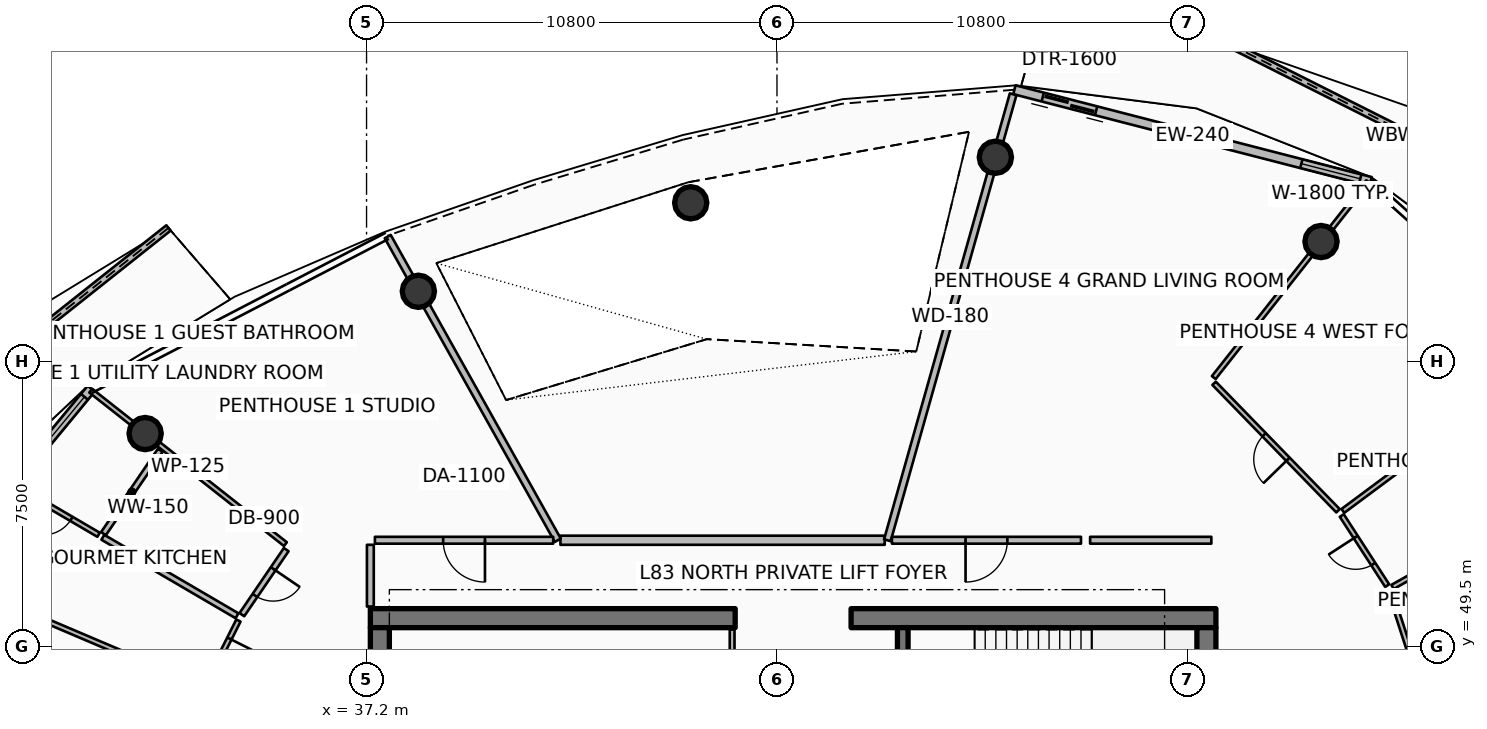
"""IFC4 building model, lengths in metres.
Left out: names, types, materials, properties, quantities, classifications, styles, units other than length and angle.
Written with IfcOpenShell. Run it as: python <this file> out.ifc"""

import sys

from ifc_helpers import new_model, si_unit, direction, frame, frame_2d, origin, origin_2d, place, context, subcontext, project, spatial, polyline, rectangle, circle, outline, extrude, element, fill, save


model = new_model("IFC4")
c1 = context("Model", 3, precision=1e-05, world=origin(), true_north=direction((0.0, 1.0)))
c2 = subcontext(c1, "Body", "Model", "MODEL_VIEW")
j1 = project(units=[si_unit("LENGTHUNIT", "METRE"), si_unit("PLANEANGLEUNIT", "RADIAN")], contexts=[c1])
p1 = place(None, origin())
s1 = spatial("IfcSite", under=j1, at=p1, CompositionType="ELEMENT")
p2 = place(p1, origin())
s2 = spatial("IfcBuilding", under=s1, at=p2, CompositionType="ELEMENT")
p3 = place(p2, frame((0.0, 0.0, 330.5)))
s3 = spatial("IfcBuildingStorey", under=s2, at=p3, CompositionType="ELEMENT", Elevation=330.5)
p4 = place(p3, frame((37.3, 50.25, 0.0), z_axis=(0.0, 0.0, 1.0), x_axis=(1.0, 0.0, 0.0)))
e1 = element("IfcWall", 1, at=p4, inside=s3, PredefinedType="SHEAR", context=c2, shape_type="SweptSolid", body=[
    extrude(rectangle(XDim=9.6, YDim=0.5, at=frame_2d((4.8, 0.0))), origin(), (0.0, 0.0, 1.0), 4.2),
])
p5 = place(p3, frame((49.95, 50.25, 0.0), z_axis=(0.0, 0.0, 1.0), x_axis=(1.0, 0.0, 0.0)))
e2 = element("IfcWall", 2, at=p5, inside=s3, PredefinedType="SHEAR", context=c2, shape_type="SweptSolid", body=[
    extrude(rectangle(XDim=9.6, YDim=0.5, at=frame_2d((4.8, 0.0))), origin(), (0.0, 0.0, 1.0), 4.2),
])
for number, where, z_axis, x_axis in (
    (3, (37.55, 34.0, 0.0), (0.0, 0.0, 1.0), (0.0, 1.0, 0.0)),
    (4, (59.3, 34.0, 0.0), (0.0, 0.0, 1.0), (0.0, 1.0, 0.0)),
):
    element("IfcWall", number, at=place(p3, frame(where, z_axis=z_axis, x_axis=x_axis)), inside=s3, PredefinedType="SHEAR", context=c2, shape_type="SweptSolid", body=[
        extrude(rectangle(XDim=16.0, YDim=0.5, at=frame_2d((8.0, 0.0))), origin(), (0.0, 0.0, 1.0), 4.2),
    ])
p6 = place(p3, frame((51.31, 46.5, 0.0), z_axis=(0.0, 0.0, 1.0), x_axis=(0.0, 1.0, 0.0)))
e5 = element("IfcWall", 5, at=p6, inside=s3, PredefinedType="SHEAR", context=c2, shape_type="SweptSolid", body=[
    extrude(rectangle(XDim=3.5, YDim=0.28, at=frame_2d((1.75, 0.0))), origin(), (0.0, 0.0, 1.0), 4.2),
])
for number, where, z_axis, x_axis in (
    (6, (62.316, 60.159, 0.0), (0.0, 0.0, 1.0), (1.0, 0.0, 0.0)),
    (7, (53.747, 62.376, 0.0), (0.0, 0.0, 1.0), (1.0, 0.0, 0.0)),
):
    element("IfcColumn", number, at=place(p3, frame(where, z_axis=z_axis, x_axis=x_axis)), inside=s3, PredefinedType="COLUMN", context=c2, shape_type="SweptSolid", body=[
        extrude(circle(Radius=0.425, at=origin_2d()), origin(), (0.0, 0.0, 1.0), 3.94),
    ])
p7 = place(p3, frame((45.73, 61.179, 0.0), z_axis=(0.0, 0.0, 1.0), x_axis=(1.0, 0.0, 0.0)))
e8 = element("IfcColumn", 8, at=p7, inside=s3, PredefinedType="COLUMN", context=c2, shape_type="SweptSolid", body=[
    extrude(circle(Radius=0.425, at=origin_2d()), origin(), (0.0, 0.0, 1.0), 4.196),
])
for number, where, z_axis, x_axis in (
    (9, (38.563, 58.851, 0.0), (0.0, 0.0, 1.0), (1.0, 0.0, 0.0)),
    (10, (31.374, 55.107, 0.0), (0.0, 0.0, 1.0), (1.0, 0.0, 0.0)),
):
    element("IfcColumn", number, at=place(p3, frame(where, z_axis=z_axis, x_axis=x_axis)), inside=s3, PredefinedType="COLUMN", context=c2, shape_type="SweptSolid", body=[
        extrude(circle(Radius=0.425, at=origin_2d()), origin(), (0.0, 0.0, 1.0), 3.94),
    ])
p8 = place(p3, frame((69.453, 60.551, 0.0), z_axis=(0.0, 0.0, 1.0), x_axis=(-0.893288240785, 0.449484281009, 0.0)))
e11 = element("IfcWall", 11, at=p8, inside=s3, PredefinedType="PARAPET", context=c2, shape_type="SweptSolid", body=[
    extrude(outline(polyline([(0.0, 0.0), (10.573, 0.0), (10.573, 1.348), (5.287, 1.562), (0.0, 1.747), (0.0, 0.0)])), frame((0.0, 0.09, 0.0), z_axis=(0.0, -1.0, 0.0), x_axis=(1.0, 0.0, 0.0)), (0.0, 0.0, 1.0), 0.18),
])
p9 = place(p3, frame((31.988, 60.517, 0.0), z_axis=(0.0, 0.0, 1.0), x_axis=(-0.78337055778, -0.621554960727, 0.0)))
e12 = element("IfcWall", 12, at=p9, inside=s3, PredefinedType="PARAPET", context=c2, shape_type="SweptSolid", body=[
    extrude(outline(polyline([(0.0, 0.0), (10.029, 0.0), (10.029, 1.832), (5.014, 1.853), (0.0, 1.756), (0.0, 0.0)])), frame((0.0, 0.09, 0.0), z_axis=(0.0, -1.0, 0.0), x_axis=(1.0, 0.0, 0.0)), (0.0, 0.0, 1.0), 0.18),
])
p10 = place(p3, frame((63.62, 61.74, 0.0), z_axis=(0.0, 0.0, 1.0), x_axis=(-0.968389062354, 0.249444630957, 0.0)))
e13 = element("IfcWall", 13, at=p10, inside=s3, PredefinedType="SOLIDWALL", context=c2, shape_type="SweptSolid", body=[
    extrude(rectangle(XDim=9.678, YDim=0.24, at=frame_2d((4.839, 0.0))), origin(), (0.0, 0.0, 1.0), 2.89),
])
p11 = place(p10, frame((7.458, 0.0, 0.0)))
e14 = element("IfcOpeningElement", 14, at=p11, cuts=e13, PredefinedType="OPENING", context=c2, shape_type="SweptSolid", body=[
    extrude(rectangle(XDim=1.45, YDim=2.15, at=frame_2d((0.725, 1.075))), frame((0.0, 0.13, 0.0), z_axis=(0.0, -1.0, 0.0), x_axis=(1.0, 0.0, 0.0)), (0.0, 0.0, 1.0), 0.26),
])
p12 = place(p10, frame((0.28, 0.0, 0.65)))
e15 = element("IfcOpeningElement", 15, at=p12, cuts=e13, PredefinedType="OPENING", context=c2, shape_type="SweptSolid", body=[
    extrude(rectangle(XDim=1.6, YDim=1.5, at=frame_2d((0.8, 0.75))), frame((0.0, 0.13, 0.0), z_axis=(0.0, -1.0, 0.0), x_axis=(1.0, 0.0, 0.0)), (0.0, 0.0, 1.0), 0.26),
])
p13 = place(p3, frame((29.955, 56.289, 0.0), z_axis=(0.0, 0.0, 1.0), x_axis=(-0.636803612721, -0.771026042897, 0.0)))
e16 = element("IfcWall", 16, at=p13, inside=s3, PredefinedType="SOLIDWALL", context=c2, shape_type="SweptSolid", body=[
    extrude(rectangle(XDim=9.728, YDim=0.24, at=frame_2d((4.864, 0.0))), origin(), (0.0, 0.0, 1.0), 2.89),
])
p14 = place(p13, frame((7.508, 0.0, 0.0)))
e17 = element("IfcOpeningElement", 17, at=p14, cuts=e16, PredefinedType="OPENING", context=c2, shape_type="SweptSolid", body=[
    extrude(rectangle(XDim=1.45, YDim=2.15, at=frame_2d((0.725, 1.075))), frame((0.0, 0.13, 0.0), z_axis=(0.0, -1.0, 0.0), x_axis=(1.0, 0.0, 0.0)), (0.0, 0.0, 1.0), 0.26),
])
p15 = place(p13, frame((0.28, 0.0, 0.65)))
e18 = element("IfcOpeningElement", 18, at=p15, cuts=e16, PredefinedType="OPENING", context=c2, shape_type="SweptSolid", body=[
    extrude(rectangle(XDim=1.6, YDim=1.5, at=frame_2d((0.8, 0.75))), frame((0.0, 0.13, 0.0), z_axis=(0.0, -1.0, 0.0), x_axis=(1.0, 0.0, 0.0)), (0.0, 0.0, 1.0), 0.26),
])
p16 = place(p3, frame((46.82, 47.92, 0.0), z_axis=(0.0, 0.0, 1.0), x_axis=(0.0, 1.0, 0.0)))
e19 = element("IfcWall", 19, at=p16, inside=s3, PredefinedType="PARTITIONING", context=c2, shape_type="SweptSolid", body=[
    extrude(rectangle(XDim=2.03, YDim=0.125, at=frame_2d((1.015, 0.0))), origin(), (0.0, 0.0, 1.0), 3.38),
])
p17 = place(p3, frame((50.835, 52.3, 0.0), z_axis=(0.0, 0.0, 1.0), x_axis=(-1.0, 0.0, 0.0)))
e20 = element("IfcWall", 20, at=p17, inside=s3, PredefinedType="SOLIDWALL", context=c2, shape_type="SweptSolid", body=[
    extrude(rectangle(XDim=8.533, YDim=0.24, at=frame_2d((4.267, 0.0))), origin(), (0.0, 0.0, 1.0), 3.38),
])
p18 = place(p3, frame((50.905, 52.3, 0.0), z_axis=(0.0, 0.0, 1.0), x_axis=(0.271453030279, 0.962451688321, 0.0)))
e21 = element("IfcWall", 21, at=p18, inside=s3, PredefinedType="PARTITIONING", context=c2, shape_type="SweptSolid", body=[
    extrude(rectangle(XDim=12.191, YDim=0.18, at=frame_2d((6.096, 0.0))), origin(), (0.0, 0.0, 1.0), 3.38),
])
p19 = place(p3, frame((42.232, 52.3, 0.0), z_axis=(0.0, 0.0, 1.0), x_axis=(-0.488623665245, 0.872494649704, 0.0)))
e22 = element("IfcWall", 22, at=p19, inside=s3, PredefinedType="PARTITIONING", context=c2, shape_type="SweptSolid", body=[
    extrude(rectangle(XDim=9.157, YDim=0.18, at=frame_2d((4.579, 0.0))), origin(), (0.0, 0.0, 1.0), 3.38),
])
p20 = place(p3, frame((42.112, 52.3, 0.0), z_axis=(0.0, 0.0, 1.0), x_axis=(-1.0, 0.0, 0.0)))
e23 = element("IfcWall", 23, at=p20, inside=s3, PredefinedType="PARTITIONING", context=c2, shape_type="SweptSolid", body=[
    extrude(rectangle(XDim=4.692, YDim=0.18, at=frame_2d((2.346, 0.0))), origin(), (0.0, 0.0, 1.0), 3.38),
])
p21 = place(p20, frame((1.796, 0.0, 0.0)))
e24 = element("IfcOpeningElement", 24, at=p21, cuts=e23, PredefinedType="OPENING", context=c2, shape_type="SweptSolid", body=[
    extrude(rectangle(XDim=1.1, YDim=2.1, at=frame_2d((0.55, 1.05))), frame((0.0, 0.1, 0.0), z_axis=(0.0, -1.0, 0.0), x_axis=(1.0, 0.0, 0.0)), (0.0, 0.0, 1.0), 0.2),
])
p22 = place(p3, frame((37.3, 52.18, 0.0), z_axis=(0.0, 0.0, 1.0), x_axis=(0.0, -1.0, 0.0)))
e25 = element("IfcWall", 25, at=p22, inside=s3, PredefinedType="PARTITIONING", context=c2, shape_type="SweptSolid", body=[
    extrude(rectangle(XDim=1.625, YDim=0.18, at=frame_2d((0.812, 0.0))), origin(), (0.0, 0.0, 1.0), 3.38),
])
p23 = place(p3, frame((35.064, 52.198, 0.0), z_axis=(0.0, 0.0, 1.0), x_axis=(-0.785319571145, 0.619090600136, 0.0)))
e26 = element("IfcWall", 26, at=p23, inside=s3, PredefinedType="PARTITIONING", context=c2, shape_type="SweptSolid", body=[
    extrude(rectangle(XDim=6.521, YDim=0.125, at=frame_2d((3.26, 0.0))), origin(), (0.0, 0.0, 1.0), 3.38),
])
p24 = place(p3, frame((35.086, 52.053, 0.0), z_axis=(0.0, 0.0, 1.0), x_axis=(-0.563373395767, -0.826202406763, 0.0)))
e27 = element("IfcWall", 27, at=p24, inside=s3, PredefinedType="PARTITIONING", context=c2, shape_type="SweptSolid", body=[
    extrude(rectangle(XDim=2.072, YDim=0.15, at=frame_2d((1.036, 0.0))), origin(), (0.0, 0.0, 1.0), 3.38),
])
p25 = place(p24, frame((0.611, 0.0, 0.0)))
e28 = element("IfcOpeningElement", 28, at=p25, cuts=e27, PredefinedType="OPENING", context=c2, shape_type="SweptSolid", body=[
    extrude(rectangle(XDim=0.85, YDim=2.06, at=frame_2d((0.425, 1.03))), frame((0.0, 0.085, 0.0), z_axis=(0.0, -1.0, 0.0), x_axis=(1.0, 0.0, 0.0)), (0.0, 0.0, 1.0), 0.17),
])
p26 = place(p3, frame((31.772, 54.666, 0.0), z_axis=(0.0, 0.0, 1.0), x_axis=(-0.563393907047, -0.826188420097, 0.0)))
e29 = element("IfcWall", 29, at=p26, inside=s3, PredefinedType="PARTITIONING", context=c2, shape_type="SweptSolid", body=[
    extrude(rectangle(XDim=2.654, YDim=0.15, at=frame_2d((1.327, 0.0))), origin(), (0.0, 0.0, 1.0), 3.38),
])
p27 = place(p3, frame((33.791, 50.313, 0.0), z_axis=(0.0, 0.0, 1.0), x_axis=(-0.863113475275, 0.505010028413, 0.0)))
e30 = element("IfcWall", 30, at=p27, inside=s3, PredefinedType="PARTITIONING", context=c2, shape_type="SweptSolid", body=[
    extrude(rectangle(XDim=4.09, YDim=0.15, at=frame_2d((2.045, 0.0))), origin(), (0.0, 0.0, 1.0), 3.38),
])
p28 = place(p3, frame((30.149, 52.444, 0.0), z_axis=(0.0, 0.0, 1.0), x_axis=(-0.863096282512, 0.505039411446, 0.0)))
e31 = element("IfcWall", 31, at=p28, inside=s3, PredefinedType="PARTITIONING", context=c2, shape_type="SweptSolid", body=[
    extrude(rectangle(XDim=2.507, YDim=0.125, at=frame_2d((1.253, 0.0))), origin(), (0.0, 0.0, 1.0), 3.38),
])
p29 = place(p28, frame((0.828, 0.0, 0.0)))
e32 = element("IfcOpeningElement", 32, at=p29, cuts=e31, PredefinedType="OPENING", context=c2, shape_type="SweptSolid", body=[
    extrude(rectangle(XDim=0.85, YDim=2.06, at=frame_2d((0.425, 1.03))), frame((0.0, 0.073, 0.0), z_axis=(0.0, -1.0, 0.0), x_axis=(1.0, 0.0, 0.0)), (0.0, 0.0, 1.0), 0.145),
])
p30 = place(p3, frame((32.851, 48.443, 0.0), z_axis=(0.0, 0.0, 1.0), x_axis=(-0.92023815321, 0.391358839655, 0.0)))
e33 = element("IfcWall", 33, at=p30, inside=s3, PredefinedType="PARTITIONING", context=c2, shape_type="SweptSolid", body=[
    extrude(rectangle(XDim=7.416, YDim=0.125, at=frame_2d((3.708, 0.0))), origin(), (0.0, 0.0, 1.0), 3.38),
])
p31 = place(p3, frame((33.828, 50.187, 0.0), z_axis=(0.0, 0.0, 1.0), x_axis=(-0.449051769977, -0.893505740262, 0.0)))
e34 = element("IfcWall", 34, at=p31, inside=s3, PredefinedType="PARTITIONING", context=c2, shape_type="SweptSolid", body=[
    extrude(rectangle(XDim=1.912, YDim=0.125, at=frame_2d((0.956, 0.0))), origin(), (0.0, 0.0, 1.0), 3.38),
])
p32 = place(p31, frame((0.531, 0.0, 0.0)))
e35 = element("IfcOpeningElement", 35, at=p32, cuts=e34, PredefinedType="OPENING", context=c2, shape_type="SweptSolid", body=[
    extrude(rectangle(XDim=0.85, YDim=2.06, at=frame_2d((0.425, 1.03))), frame((0.0, 0.073, 0.0), z_axis=(0.0, -1.0, 0.0), x_axis=(1.0, 0.0, 0.0)), (0.0, 0.0, 1.0), 0.145),
])
p33 = place(p3, frame((56.0, 52.3, 0.0), z_axis=(0.0, 0.0, 1.0), x_axis=(-1.0, 0.0, 0.0)))
e36 = element("IfcWall", 36, at=p33, inside=s3, PredefinedType="PARTITIONING", context=c2, shape_type="SweptSolid", body=[
    extrude(rectangle(XDim=4.975, YDim=0.18, at=frame_2d((2.488, 0.0))), origin(), (0.0, 0.0, 1.0), 3.38),
])
p34 = place(p33, frame((1.938, 0.0, 0.0)))
e37 = element("IfcOpeningElement", 37, at=p34, cuts=e36, PredefinedType="OPENING", context=c2, shape_type="SweptSolid", body=[
    extrude(rectangle(XDim=1.1, YDim=2.1, at=frame_2d((0.55, 1.05))), frame((0.0, 0.1, 0.0), z_axis=(0.0, -1.0, 0.0), x_axis=(1.0, 0.0, 0.0)), (0.0, 0.0, 1.0), 0.2),
])
p35 = place(p3, frame((66.304, 44.275, 0.0), z_axis=(0.0, 0.0, 1.0), x_axis=(-0.309004669588, 0.951060520773, 0.0)))
e38 = element("IfcWall", 38, at=p35, inside=s3, PredefinedType="PARTITIONING", context=c2, shape_type="SweptSolid", body=[
    extrude(rectangle(XDim=6.985, YDim=0.125, at=frame_2d((3.493, 0.0))), origin(), (0.0, 0.0, 1.0), 3.38),
])
p36 = place(p35, frame((3.042, 0.0, 0.0)))
e39 = element("IfcOpeningElement", 39, at=p36, cuts=e38, PredefinedType="OPENING", context=c2, shape_type="SweptSolid", body=[
    extrude(rectangle(XDim=0.9, YDim=2.08, at=frame_2d((0.45, 1.04))), frame((0.0, 0.073, 0.0), z_axis=(0.0, -1.0, 0.0), x_axis=(1.0, 0.0, 0.0)), (0.0, 0.0, 1.0), 0.145),
])
p37 = place(p3, frame((59.43, 52.3, 0.0), z_axis=(0.0, 0.0, 1.0), x_axis=(-1.0, 0.0, 0.0)))
e40 = element("IfcWall", 40, at=p37, inside=s3, PredefinedType="PARTITIONING", context=c2, shape_type="SweptSolid", body=[
    extrude(rectangle(XDim=3.19, YDim=0.18, at=frame_2d((1.595, 0.0))), origin(), (0.0, 0.0, 1.0), 3.38),
])
p38 = place(p3, frame((64.199, 51.072, 0.0), z_axis=(0.0, 0.0, 1.0), x_axis=(0.87250315253, 0.488608482146, 0.0)))
e41 = element("IfcWall", 41, at=p38, inside=s3, PredefinedType="PARTITIONING", context=c2, shape_type="SweptSolid", body=[
    extrude(rectangle(XDim=7.27, YDim=0.125, at=frame_2d((3.635, 0.0))), origin(), (0.0, 0.0, 1.0), 3.38),
])
p39 = place(p3, frame((59.494, 56.58, 0.0), z_axis=(0.0, 0.0, 1.0), x_axis=(0.619074661851, 0.785332135503, 0.0)))
e42 = element("IfcWall", 42, at=p39, inside=s3, PredefinedType="PARTITIONING", context=c2, shape_type="SweptSolid", body=[
    extrude(rectangle(XDim=6.561, YDim=0.125, at=frame_2d((3.281, 0.0))), origin(), (0.0, 0.0, 1.0), 3.38),
])
p40 = place(p3, frame((62.891, 53.071, 0.0), z_axis=(0.0, 0.0, 1.0), x_axis=(0.802496866104, 0.596656333154, 0.0)))
e43 = element("IfcWall", 43, at=p40, inside=s3, PredefinedType="PARTITIONING", context=c2, shape_type="SweptSolid", body=[
    extrude(rectangle(XDim=7.032, YDim=0.125, at=frame_2d((3.516, 0.0))), origin(), (0.0, 0.0, 1.0), 3.38),
])
p41 = place(p3, frame((64.057, 51.107, 0.0), z_axis=(0.0, 0.0, 1.0), x_axis=(-0.543753429113, 0.83924502282, 0.0)))
e44 = element("IfcWall", 44, at=p41, inside=s3, PredefinedType="PARTITIONING", context=c2, shape_type="SweptSolid", body=[
    extrude(rectangle(XDim=2.197, YDim=0.125, at=frame_2d((1.099, 0.0))), origin(), (0.0, 0.0, 1.0), 3.38),
])
p42 = place(p41, frame((0.673, 0.0, 0.0)))
e45 = element("IfcOpeningElement", 45, at=p42, cuts=e44, PredefinedType="OPENING", context=c2, shape_type="SweptSolid", body=[
    extrude(rectangle(XDim=0.85, YDim=2.06, at=frame_2d((0.425, 1.03))), frame((0.0, 0.073, 0.0), z_axis=(0.0, -1.0, 0.0), x_axis=(1.0, 0.0, 0.0)), (0.0, 0.0, 1.0), 0.145),
])
p43 = place(p3, frame((62.763, 53.075, 0.0), z_axis=(0.0, 0.0, 1.0), x_axis=(-0.69701729014, 0.717054319592, 0.0)))
e46 = element("IfcWall", 46, at=p43, inside=s3, PredefinedType="PARTITIONING", context=c2, shape_type="SweptSolid", body=[
    extrude(rectangle(XDim=4.679, YDim=0.125, at=frame_2d((2.339, 0.0))), origin(), (0.0, 0.0, 1.0), 3.38),
])
p44 = place(p43, frame((1.889, 0.0, 0.0)))
e47 = element("IfcOpeningElement", 47, at=p44, cuts=e46, PredefinedType="OPENING", context=c2, shape_type="SweptSolid", body=[
    extrude(rectangle(XDim=0.9, YDim=2.08, at=frame_2d((0.45, 1.04))), frame((0.0, 0.073, 0.0), z_axis=(0.0, -1.0, 0.0), x_axis=(1.0, 0.0, 0.0)), (0.0, 0.0, 1.0), 0.145),
])
p45 = place(p11, origin())
e48 = element("IfcDoor", 48, at=p45, inside=s3, OperationType="DOUBLE_DOOR_SLIDING", PredefinedType="DOOR", context=c2, shape_type="SweptSolid", body=[
    extrude(rectangle(XDim=1.45, YDim=2.15, at=frame_2d((0.725, 1.075))), frame((0.0, 0.025, 0.0), z_axis=(0.0, -1.0, 0.0), x_axis=(1.0, 0.0, 0.0)), (0.0, 0.0, 1.0), 0.05),
])
fill(e14, e48)
p46 = place(p12, origin())
e49 = element("IfcWindow", 49, at=p46, inside=s3, PartitioningType="SINGLE_PANEL", PredefinedType="WINDOW", context=c2, shape_type="SweptSolid", body=[
    extrude(rectangle(XDim=1.6, YDim=1.5, at=frame_2d((0.8, 0.75))), frame((0.0, 0.03, 0.0), z_axis=(0.0, -1.0, 0.0), x_axis=(1.0, 0.0, 0.0)), (0.0, 0.0, 1.0), 0.06),
])
fill(e15, e49)
p47 = place(p15, origin())
e50 = element("IfcWindow", 50, at=p47, inside=s3, PartitioningType="SINGLE_PANEL", PredefinedType="WINDOW", context=c2, shape_type="SweptSolid", body=[
    extrude(rectangle(XDim=1.6, YDim=1.5, at=frame_2d((0.8, 0.75))), frame((0.0, 0.03, 0.0), z_axis=(0.0, -1.0, 0.0), x_axis=(1.0, 0.0, 0.0)), (0.0, 0.0, 1.0), 0.06),
])
fill(e18, e50)
p48 = place(p21, origin())
e51 = element("IfcDoor", 51, at=p48, inside=s3, OperationType="SINGLE_SWING_LEFT", PredefinedType="DOOR", context=c2, shape_type="SweptSolid", body=[
    extrude(rectangle(XDim=1.1, YDim=2.1, at=frame_2d((0.55, 1.05))), frame((0.0, 0.025, 0.0), z_axis=(0.0, -1.0, 0.0), x_axis=(1.0, 0.0, 0.0)), (0.0, 0.0, 1.0), 0.05),
])
fill(e24, e51)
p49 = place(p25, origin())
e52 = element("IfcDoor", 52, at=p49, inside=s3, OperationType="SINGLE_SWING_LEFT", PredefinedType="DOOR", context=c2, shape_type="SweptSolid", body=[
    extrude(rectangle(XDim=0.85, YDim=2.06, at=frame_2d((0.425, 1.03))), frame((0.0, 0.025, 0.0), z_axis=(0.0, -1.0, 0.0), x_axis=(1.0, 0.0, 0.0)), (0.0, 0.0, 1.0), 0.05),
])
fill(e28, e52)
p50 = place(p29, origin())
e53 = element("IfcDoor", 53, at=p50, inside=s3, OperationType="SINGLE_SWING_RIGHT", PredefinedType="DOOR", context=c2, shape_type="SweptSolid", body=[
    extrude(rectangle(XDim=0.85, YDim=2.06, at=frame_2d((0.425, 1.03))), frame((0.0, 0.025, 0.0), z_axis=(0.0, -1.0, 0.0), x_axis=(1.0, 0.0, 0.0)), (0.0, 0.0, 1.0), 0.05),
])
fill(e32, e53)
p51 = place(p32, origin())
e54 = element("IfcDoor", 54, at=p51, inside=s3, OperationType="SINGLE_SWING_LEFT", PredefinedType="DOOR", context=c2, shape_type="SweptSolid", body=[
    extrude(rectangle(XDim=0.85, YDim=2.06, at=frame_2d((0.425, 1.03))), frame((0.0, 0.025, 0.0), z_axis=(0.0, -1.0, 0.0), x_axis=(1.0, 0.0, 0.0)), (0.0, 0.0, 1.0), 0.05),
])
fill(e35, e54)
p52 = place(p34, origin())
e55 = element("IfcDoor", 55, at=p52, inside=s3, OperationType="SINGLE_SWING_RIGHT", PredefinedType="DOOR", context=c2, shape_type="SweptSolid", body=[
    extrude(rectangle(XDim=1.1, YDim=2.1, at=frame_2d((0.55, 1.05))), frame((0.0, 0.025, 0.0), z_axis=(0.0, -1.0, 0.0), x_axis=(1.0, 0.0, 0.0)), (0.0, 0.0, 1.0), 0.05),
])
fill(e37, e55)
p53 = place(p42, origin())
e56 = element("IfcDoor", 56, at=p53, inside=s3, OperationType="SINGLE_SWING_RIGHT", PredefinedType="DOOR", context=c2, shape_type="SweptSolid", body=[
    extrude(rectangle(XDim=0.85, YDim=2.06, at=frame_2d((0.425, 1.03))), frame((0.0, 0.025, 0.0), z_axis=(0.0, -1.0, 0.0), x_axis=(1.0, 0.0, 0.0)), (0.0, 0.0, 1.0), 0.05),
])
fill(e45, e56)
p54 = place(p44, origin())
e57 = element("IfcDoor", 57, at=p54, inside=s3, OperationType="SINGLE_SWING_LEFT", PredefinedType="DOOR", context=c2, shape_type="SweptSolid", body=[
    extrude(rectangle(XDim=0.9, YDim=2.08, at=frame_2d((0.45, 1.04))), frame((0.0, 0.025, 0.0), z_axis=(0.0, -1.0, 0.0), x_axis=(1.0, 0.0, 0.0)), (0.0, 0.0, 1.0), 0.05),
])
fill(e47, e57)
save(model, sys.argv[1])
